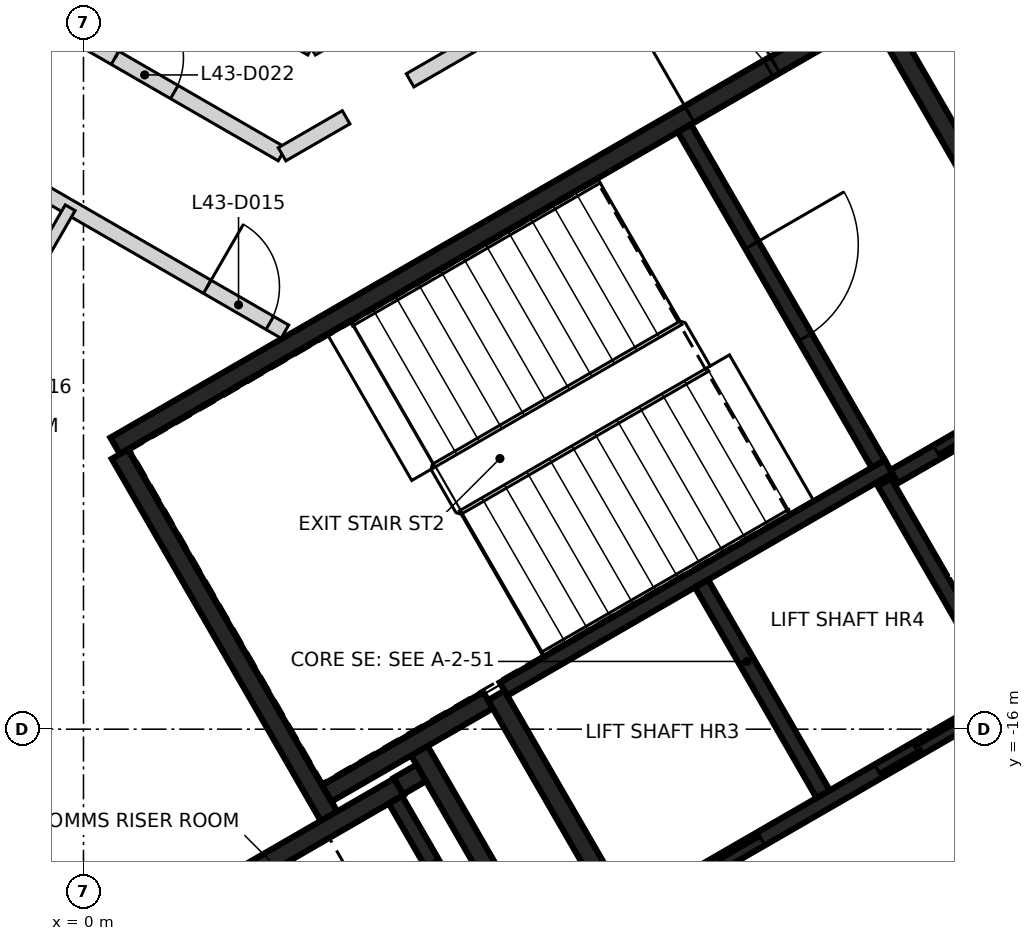
"""IFC4 building model, lengths in metres.
Left out: names, types, materials, properties, quantities, classifications, styles, units other than length and angle.
Written with IfcOpenShell. Run it as: python <this file> out.ifc"""

import sys

from ifc_helpers import new_model, si_unit, direction, frame, frame_2d, origin, place, context, subcontext, project, spatial, rectangle, extrude, element, fill, save


model = new_model("IFC4")
c1 = context("Model", 3, precision=1e-05, world=origin(), true_north=direction((0.0, 1.0)))
c2 = subcontext(c1, "Body", "Model", "MODEL_VIEW")
j1 = project(units=[si_unit("LENGTHUNIT", "METRE"), si_unit("PLANEANGLEUNIT", "RADIAN")], contexts=[c1])
p1 = place(None, origin())
s1 = spatial("IfcSite", under=j1, at=p1, CompositionType="ELEMENT")
p2 = place(p1, origin())
s2 = spatial("IfcBuilding", under=s1, at=p2, CompositionType="ELEMENT")
p3 = place(p2, frame((0.0, 0.0, 175.6)))
s3 = spatial("IfcBuildingStorey", under=s2, at=p3, CompositionType="ELEMENT", Elevation=175.6)
p4 = place(p3, frame((0.417, -12.273, 0.0), z_axis=(0.0, 0.0, 1.0), x_axis=(0.866021906294, 0.500006057782, 0.0)))
e1 = element("IfcWall", 1, at=p4, inside=s3, PredefinedType="SHEAR", context=c2, shape_type="SweptSolid", body=[
    extrude(rectangle(XDim=11.55, YDim=0.25, at=frame_2d((5.775, 0.0))), origin(), (0.0, 0.0, 1.0), 3.25),
])
p5 = place(p4, frame((10.025, 0.0, 0.0)))
e2 = element("IfcOpeningElement", 2, at=p5, cuts=e1, PredefinedType="OPENING", context=c2, shape_type="SweptSolid", body=[
    extrude(rectangle(XDim=1.2, YDim=2.1, at=frame_2d((0.6, 1.05))), frame((0.0, 0.135, 0.0), z_axis=(0.0, -1.0, 0.0), x_axis=(1.0, 0.0, 0.0)), (0.0, 0.0, 1.0), 0.27),
])
p6 = place(p4, frame((8.725, 0.0, 0.0)))
e3 = element("IfcOpeningElement", 3, at=p6, cuts=e1, PredefinedType="OPENING", context=c2, shape_type="SweptSolid", body=[
    extrude(rectangle(XDim=1.2, YDim=2.1, at=frame_2d((0.6, 1.05))), frame((0.0, 0.135, 0.0), z_axis=(0.0, -1.0, 0.0), x_axis=(1.0, 0.0, 0.0)), (0.0, 0.0, 1.0), 0.27),
])
p7 = place(p3, frame((3.235, -17.153, 0.0), z_axis=(0.0, 0.0, 1.0), x_axis=(-0.500008851346, 0.866020293397, 0.0)))
e4 = element("IfcWall", 4, at=p7, inside=s3, PredefinedType="SHEAR", context=c2, shape_type="SweptSolid", body=[
    extrude(rectangle(XDim=5.51, YDim=0.25, at=frame_2d((2.755, 0.0))), origin(), (0.0, 0.0, 1.0), 3.25),
])
p8 = place(p3, frame((10.483, -6.606, 0.0), z_axis=(0.0, 0.0, 1.0), x_axis=(0.49999885962, -0.866026062182, 0.0)))
e5 = element("IfcWall", 5, at=p8, inside=s3, PredefinedType="SHEAR", context=c2, shape_type="SweptSolid", body=[
    extrude(rectangle(XDim=5.225, YDim=0.25, at=frame_2d((2.612, 0.0))), origin(), (0.0, 0.0, 1.0), 3.25),
])
p9 = place(p3, frame((7.031, -18.327, 0.0), z_axis=(0.0, 0.0, 1.0), x_axis=(-0.499971222258, 0.866042017984, 0.0)))
e6 = element("IfcWall", 6, at=p9, inside=s3, PredefinedType="SHEAR", context=c2, shape_type="SweptSolid", body=[
    extrude(rectangle(XDim=3.2, YDim=0.25, at=frame_2d((1.6, 0.0))), origin(), (0.0, 0.0, 1.0), 3.25),
])
p10 = place(p3, frame((1.669, -18.19, 0.0), z_axis=(0.0, 0.0, 1.0), x_axis=(0.866042235819, 0.499970844928, 0.0)))
e7 = element("IfcWall", 7, at=p10, inside=s3, PredefinedType="SHEAR", context=c2, shape_type="SweptSolid", body=[
    extrude(rectangle(XDim=2.865, YDim=0.25, at=frame_2d((1.432, 0.0))), origin(), (0.0, 0.0, 1.0), 3.25),
])
p11 = place(p3, frame((4.414, -16.276, 0.0), z_axis=(0.0, 0.0, 1.0), x_axis=(0.500003324108, -0.866023484601, 0.0)))
e8 = element("IfcWall", 8, at=p11, inside=s3, PredefinedType="SHEAR", context=c2, shape_type="SweptSolid", body=[
    extrude(rectangle(XDim=3.085, YDim=0.25, at=frame_2d((1.542, 0.0))), origin(), (0.0, 0.0, 1.0), 3.25),
])
p12 = place(p3, frame((5.322, -15.619, 0.0), z_axis=(0.0, 0.0, 1.0), x_axis=(-0.866026229868, -0.499998569178, 0.0)))
e9 = element("IfcWall", 9, at=p12, inside=s3, PredefinedType="SHEAR", context=c2, shape_type="SweptSolid", body=[
    extrude(rectangle(XDim=2.449, YDim=0.25, at=frame_2d((1.225, 0.0))), origin(), (0.0, 0.0, 1.0), 3.25),
])
p13 = place(p3, frame((4.145, -16.749, 0.0), z_axis=(0.0, 0.0, 1.0), x_axis=(0.866185586049, 0.49972245349, 0.0)))
e10 = element("IfcWall", 10, at=p13, inside=s3, PredefinedType="SHEAR", context=c2, shape_type="SweptSolid", body=[
    extrude(rectangle(XDim=0.344, YDim=0.25, at=frame_2d((0.172, 0.0))), origin(), (0.0, 0.0, 1.0), 3.25),
])
p14 = place(p3, frame((9.052, -20.48, 0.0), z_axis=(0.0, 0.0, 1.0), x_axis=(0.866030299012, 0.499991521122, 0.0)))
e11 = element("IfcWall", 11, at=p14, inside=s3, PredefinedType="SHEAR", context=c2, shape_type="SweptSolid", body=[
    extrude(rectangle(XDim=6.1, YDim=0.2, at=frame_2d((3.05, 0.0))), origin(), (0.0, 0.0, 1.0), 3.25),
])
p15 = place(p3, frame((5.526, -15.472, 0.0), z_axis=(0.0, 0.0, 1.0), x_axis=(0.866041752167, 0.499971682701, 0.0)))
e12 = element("IfcWall", 12, at=p15, inside=s3, PredefinedType="SHEAR", context=c2, shape_type="SweptSolid", body=[
    extrude(rectangle(XDim=5.851, YDim=0.2, at=frame_2d((2.925, 0.0))), origin(), (0.0, 0.0, 1.0), 3.25),
])
p16 = place(p3, frame((12.293, -15.491, 0.0), z_axis=(0.0, 0.0, 1.0), x_axis=(-0.866030299012, -0.499991521122, 0.0)))
e13 = element("IfcWall", 13, at=p16, inside=s3, PredefinedType="SHEAR", context=c2, shape_type="SweptSolid", body=[
    extrude(rectangle(XDim=6.1, YDim=0.2, at=frame_2d((3.05, 0.0))), origin(), (0.0, 0.0, 1.0), 3.25),
])
p17 = place(p16, frame((3.9, 0.0, 0.0)))
e14 = element("IfcOpeningElement", 14, at=p17, cuts=e13, PredefinedType="OPENING", context=c2, shape_type="SweptSolid", body=[
    extrude(rectangle(XDim=1.2, YDim=2.1, at=frame_2d((0.6, 1.05))), frame((0.0, 0.11, 0.0), z_axis=(0.0, -1.0, 0.0), x_axis=(1.0, 0.0, 0.0)), (0.0, 0.0, 1.0), 0.22),
])
p18 = place(p16, frame((0.918, 0.0, 0.0)))
e15 = element("IfcOpeningElement", 15, at=p18, cuts=e13, PredefinedType="OPENING", context=c2, shape_type="SweptSolid", body=[
    extrude(rectangle(XDim=1.2, YDim=2.1, at=frame_2d((0.6, 1.05))), frame((0.0, 0.11, 0.0), z_axis=(0.0, -1.0, 0.0), x_axis=(1.0, 0.0, 0.0)), (0.0, 0.0, 1.0), 0.22),
])
p19 = place(p3, frame((7.906, -8.094, 0.0), z_axis=(0.0, 0.0, 1.0), x_axis=(0.500027839223, -0.866009330205, 0.0)))
e16 = element("IfcWall", 16, at=p19, inside=s3, PredefinedType="SHEAR", context=c2, shape_type="SweptSolid", body=[
    extrude(rectangle(XDim=5.098, YDim=0.2, at=frame_2d((2.549, 0.0))), origin(), (0.0, 0.0, 1.0), 3.25),
])
p20 = place(p19, frame((1.774, 0.0, 0.0)))
e17 = element("IfcOpeningElement", 17, at=p20, cuts=e16, PredefinedType="OPENING", context=c2, shape_type="SweptSolid", body=[
    extrude(rectangle(XDim=1.4, YDim=2.1, at=frame_2d((0.7, 1.05))), frame((0.0, 0.11, 0.0), z_axis=(0.0, -1.0, 0.0), x_axis=(1.0, 0.0, 0.0)), (0.0, 0.0, 1.0), 0.22),
])
p21 = place(p3, frame((8.132, -14.084, 0.0), z_axis=(0.0, 0.0, 1.0), x_axis=(0.499997778408, -0.866026686418, 0.0)))
e18 = element("IfcWall", 18, at=p21, inside=s3, PredefinedType="SHEAR", context=c2, shape_type="SweptSolid", body=[
    extrude(rectangle(XDim=3.198, YDim=0.2, at=frame_2d((1.599, 0.0))), origin(), (0.0, 0.0, 1.0), 3.25),
])
p22 = place(p3, frame((5.503, -19.352, 0.0), z_axis=(0.0, 0.0, 1.0), x_axis=(-0.499986818241, 0.866033014143, 0.0)))
e19 = element("IfcWall", 19, at=p22, inside=s3, PredefinedType="SHEAR", context=c2, shape_type="SweptSolid", body=[
    extrude(rectangle(XDim=2.798, YDim=0.2, at=frame_2d((1.399, 0.0))), origin(), (0.0, 0.0, 1.0), 3.25),
])
p23 = place(p22, frame((0.949, 0.0, 0.0)))
e20 = element("IfcOpeningElement", 20, at=p23, cuts=e19, PredefinedType="OPENING", context=c2, shape_type="SweptSolid", body=[
    extrude(rectangle(XDim=0.9, YDim=2.1, at=frame_2d((0.45, 1.05))), frame((0.0, 0.11, 0.0), z_axis=(0.0, -1.0, 0.0), x_axis=(1.0, 0.0, 0.0)), (0.0, 0.0, 1.0), 0.22),
])
p24 = place(p3, frame((12.088, -15.437, 0.0), z_axis=(0.0, 0.0, 1.0), x_axis=(-0.500026960575, 0.86600983753, 0.0)))
e21 = element("IfcWall", 21, at=p24, inside=s3, PredefinedType="SHEAR", context=c2, shape_type="SweptSolid", body=[
    extrude(rectangle(XDim=3.1, YDim=0.2, at=frame_2d((1.55, 0.0))), origin(), (0.0, 0.0, 1.0), 3.25),
])
p25 = place(p3, frame((10.666, -12.678, 0.0), z_axis=(0.0, 0.0, 1.0), x_axis=(0.866018407898, 0.500012117035, 0.0)))
e22 = element("IfcWall", 22, at=p25, inside=s3, PredefinedType="SHEAR", context=c2, shape_type="SweptSolid", body=[
    extrude(rectangle(XDim=2.651, YDim=0.2, at=frame_2d((1.325, 0.0))), origin(), (0.0, 0.0, 1.0), 3.25),
])
p26 = place(p25, frame((0.652, 0.0, 0.0)))
e23 = element("IfcOpeningElement", 23, at=p26, cuts=e22, PredefinedType="OPENING", context=c2, shape_type="SweptSolid", body=[
    extrude(rectangle(XDim=1.3, YDim=2.1, at=frame_2d((0.65, 1.05))), frame((0.0, 0.11, 0.0), z_axis=(0.0, -1.0, 0.0), x_axis=(1.0, 0.0, 0.0)), (0.0, 0.0, 1.0), 0.22),
])
p27 = place(p3, frame((-8.612, -1.956, 0.0), z_axis=(0.0, 0.0, 1.0), x_axis=(0.866034386606, -0.499984440973, 0.0)))
e24 = element("IfcWall", 24, at=p27, inside=s3, PredefinedType="PARTITIONING", context=c2, shape_type="SweptSolid", body=[
    extrude(rectangle(XDim=12.96, YDim=0.2, at=frame_2d((6.48, 0.0))), origin(), (0.0, 0.0, 1.0), 3.25),
])
p28 = place(p27, frame((3.955, 0.0, 0.0)))
e25 = element("IfcOpeningElement", 25, at=p28, cuts=e24, PredefinedType="OPENING", context=c2, shape_type="SweptSolid", body=[
    extrude(rectangle(XDim=0.9, YDim=2.1, at=frame_2d((0.45, 1.05))), frame((0.0, 0.11, 0.0), z_axis=(0.0, -1.0, 0.0), x_axis=(1.0, 0.0, 0.0)), (0.0, 0.0, 1.0), 0.22),
])
p29 = place(p27, frame((10.424, 0.0, 0.0)))
e26 = element("IfcOpeningElement", 26, at=p29, cuts=e24, PredefinedType="OPENING", context=c2, shape_type="SweptSolid", body=[
    extrude(rectangle(XDim=0.9, YDim=2.1, at=frame_2d((0.45, 1.05))), frame((0.0, 0.11, 0.0), z_axis=(0.0, -1.0, 0.0), x_axis=(1.0, 0.0, 0.0)), (0.0, 0.0, 1.0), 0.22),
])
p30 = place(p3, frame((-8.33, -4.428, 0.0), z_axis=(0.0, 0.0, 1.0), x_axis=(0.865923263811, -0.500176869909, 0.0)))
e27 = element("IfcWall", 27, at=p30, inside=s3, PredefinedType="PARTITIONING", context=c2, shape_type="SweptSolid", body=[
    extrude(rectangle(XDim=12.68, YDim=0.2, at=frame_2d((6.34, 0.0))), origin(), (0.0, 0.0, 1.0), 3.25),
])
p31 = place(p30, frame((2.87, 0.0, 0.0)))
e28 = element("IfcOpeningElement", 28, at=p31, cuts=e27, PredefinedType="OPENING", context=c2, shape_type="SweptSolid", body=[
    extrude(rectangle(XDim=0.95, YDim=2.1, at=frame_2d((0.475, 1.05))), frame((0.0, 0.11, 0.0), z_axis=(0.0, -1.0, 0.0), x_axis=(1.0, 0.0, 0.0)), (0.0, 0.0, 1.0), 0.22),
])
p32 = place(p30, frame((11.5, 0.0, 0.0)))
e29 = element("IfcOpeningElement", 29, at=p32, cuts=e27, PredefinedType="OPENING", context=c2, shape_type="SweptSolid", body=[
    extrude(rectangle(XDim=0.95, YDim=2.1, at=frame_2d((0.475, 1.05))), frame((0.0, 0.11, 0.0), z_axis=(0.0, -1.0, 0.0), x_axis=(1.0, 0.0, 0.0)), (0.0, 0.0, 1.0), 0.22),
])
p33 = place(p3, frame((2.612, -8.437, 0.0), z_axis=(0.0, 0.0, 1.0), x_axis=(0.866026830048, 0.499997529631, 0.0)))
e30 = element("IfcWall", 30, at=p33, inside=s3, PredefinedType="PARTITIONING", context=c2, shape_type="SweptSolid", body=[
    extrude(rectangle(XDim=0.973, YDim=0.2, at=frame_2d((0.487, 0.0))), origin(), (0.0, 0.0, 1.0), 3.25),
])
p34 = place(p3, frame((4.297, -7.464, 0.0), z_axis=(0.0, 0.0, 1.0), x_axis=(0.866026378386, 0.499998311937, 0.0)))
e31 = element("IfcWall", 31, at=p34, inside=s3, PredefinedType="PARTITIONING", context=c2, shape_type="SweptSolid", body=[
    extrude(rectangle(XDim=1.966, YDim=0.2, at=frame_2d((0.983, 0.0))), origin(), (0.0, 0.0, 1.0), 3.25),
])
p35 = place(p3, frame((11.216, -5.058, 0.0), z_axis=(0.0, 0.0, 1.0), x_axis=(0.51393500197, -0.857829128527, 0.0)))
e32 = element("IfcWall", 32, at=p35, inside=s3, PredefinedType="PARTITIONING", context=c2, shape_type="SweptSolid", body=[
    extrude(rectangle(XDim=10.951, YDim=0.2, at=frame_2d((5.475, 0.0))), origin(), (0.0, 0.0, 1.0), 3.25),
])
p36 = place(p35, frame((4.438, 0.0, 0.0)))
e33 = element("IfcOpeningElement", 33, at=p36, cuts=e32, PredefinedType="OPENING", context=c2, shape_type="SweptSolid", body=[
    extrude(rectangle(XDim=0.95, YDim=2.1, at=frame_2d((0.475, 1.05))), frame((0.0, 0.11, 0.0), z_axis=(0.0, -1.0, 0.0), x_axis=(1.0, 0.0, 0.0)), (0.0, 0.0, 1.0), 0.22),
])
p37 = place(p3, frame((-7.6, -0.924, 0.0), z_axis=(0.0, 0.0, 1.0), x_axis=(0.866028806638, -0.499994106039, 0.0)))
e34 = element("IfcWall", 34, at=p37, inside=s3, PredefinedType="PARTITIONING", context=c2, shape_type="SweptSolid", body=[
    extrude(rectangle(XDim=12.24, YDim=0.2, at=frame_2d((6.12, 0.0))), origin(), (0.0, 0.0, 1.0), 3.25),
])
p38 = place(p3, frame((3.0, -7.044, 0.0), z_axis=(0.0, 0.0, 1.0), x_axis=(0.865875248522, 0.500259986404, 0.0)))
e35 = element("IfcWall", 35, at=p38, inside=s3, PredefinedType="PARTITIONING", context=c2, shape_type="SweptSolid", body=[
    extrude(rectangle(XDim=1.848, YDim=0.2, at=frame_2d((0.924, 0.0))), origin(), (0.0, 0.0, 1.0), 3.25),
])
p39 = place(p3, frame((-1.371, -11.213, 0.0), z_axis=(0.0, 0.0, 1.0), x_axis=(0.499748946523, 0.866170301066, 0.0)))
e36 = element("IfcWall", 36, at=p39, inside=s3, PredefinedType="PARTITIONING", context=c2, shape_type="SweptSolid", body=[
    extrude(rectangle(XDim=2.393, YDim=0.15, at=frame_2d((1.197, 0.0))), origin(), (0.0, 0.0, 1.0), 3.25),
])
p40 = place(p39, frame((0.796, 0.0, 0.0)))
e37 = element("IfcOpeningElement", 37, at=p40, cuts=e36, PredefinedType="OPENING", context=c2, shape_type="SweptSolid", body=[
    extrude(rectangle(XDim=0.8, YDim=2.1, at=frame_2d((0.4, 1.05))), frame((0.0, 0.085, 0.0), z_axis=(0.0, -1.0, 0.0), x_axis=(1.0, 0.0, 0.0)), (0.0, 0.0, 1.0), 0.17),
])
p41 = place(p26, origin())
e38 = element("IfcDoor", 38, at=p41, inside=s3, OperationType="SLIDING_TO_LEFT", PredefinedType="DOOR", context=c2, shape_type="SweptSolid", body=[
    extrude(rectangle(XDim=1.3, YDim=2.1, at=frame_2d((0.65, 1.05))), frame((0.0, 0.025, 0.0), z_axis=(0.0, -1.0, 0.0), x_axis=(1.0, 0.0, 0.0)), (0.0, 0.0, 1.0), 0.05),
])
fill(e23, e38)
p42 = place(p17, origin())
e39 = element("IfcDoor", 39, at=p42, inside=s3, OperationType="DOUBLE_DOOR_SLIDING", PredefinedType="DOOR", context=c2, shape_type="SweptSolid", body=[
    extrude(rectangle(XDim=1.2, YDim=2.1, at=frame_2d((0.6, 1.05))), frame((0.0, 0.025, 0.0), z_axis=(0.0, -1.0, 0.0), x_axis=(1.0, 0.0, 0.0)), (0.0, 0.0, 1.0), 0.05),
])
fill(e14, e39)
p43 = place(p18, origin())
e40 = element("IfcDoor", 40, at=p43, inside=s3, OperationType="DOUBLE_DOOR_SLIDING", PredefinedType="DOOR", context=c2, shape_type="SweptSolid", body=[
    extrude(rectangle(XDim=1.2, YDim=2.1, at=frame_2d((0.6, 1.05))), frame((0.0, 0.025, 0.0), z_axis=(0.0, -1.0, 0.0), x_axis=(1.0, 0.0, 0.0)), (0.0, 0.0, 1.0), 0.05),
])
fill(e15, e40)
p44 = place(p5, origin())
e41 = element("IfcDoor", 41, at=p44, inside=s3, OperationType="SINGLE_SWING_LEFT", PredefinedType="DOOR", context=c2, shape_type="SweptSolid", body=[
    extrude(rectangle(XDim=1.2, YDim=2.1, at=frame_2d((0.6, 1.05))), frame((0.0, 0.025, 0.0), z_axis=(0.0, -1.0, 0.0), x_axis=(1.0, 0.0, 0.0)), (0.0, 0.0, 1.0), 0.05),
])
fill(e2, e41)
p45 = place(p6, origin())
e42 = element("IfcDoor", 42, at=p45, inside=s3, OperationType="SINGLE_SWING_RIGHT", PredefinedType="DOOR", context=c2, shape_type="SweptSolid", body=[
    extrude(rectangle(XDim=1.2, YDim=2.1, at=frame_2d((0.6, 1.05))), frame((0.0, 0.025, 0.0), z_axis=(0.0, -1.0, 0.0), x_axis=(1.0, 0.0, 0.0)), (0.0, 0.0, 1.0), 0.05),
])
fill(e3, e42)
p46 = place(p20, origin())
e43 = element("IfcDoor", 43, at=p46, inside=s3, OperationType="SINGLE_SWING_LEFT", PredefinedType="DOOR", context=c2, shape_type="SweptSolid", body=[
    extrude(rectangle(XDim=1.4, YDim=2.1, at=frame_2d((0.7, 1.05))), frame((0.0, 0.025, 0.0), z_axis=(0.0, -1.0, 0.0), x_axis=(1.0, 0.0, 0.0)), (0.0, 0.0, 1.0), 0.05),
])
fill(e17, e43)
p47 = place(p32, frame((0.95, 0.0, 0.0), z_axis=(0.0, 0.0, 1.0), x_axis=(-1.0, 0.0, 0.0)))
e44 = element("IfcDoor", 44, at=p47, inside=s3, OperationType="SINGLE_SWING_LEFT", PredefinedType="DOOR", context=c2, shape_type="SweptSolid", body=[
    extrude(rectangle(XDim=0.95, YDim=2.1, at=frame_2d((0.475, 1.05))), frame((0.0, 0.025, 0.0), z_axis=(0.0, -1.0, 0.0), x_axis=(1.0, 0.0, 0.0)), (0.0, 0.0, 1.0), 0.05),
])
fill(e29, e44)
p48 = place(p29, origin())
e45 = element("IfcDoor", 45, at=p48, inside=s3, OperationType="SINGLE_SWING_LEFT", PredefinedType="DOOR", context=c2, shape_type="SweptSolid", body=[
    extrude(rectangle(XDim=0.9, YDim=2.1, at=frame_2d((0.45, 1.05))), frame((0.0, 0.025, 0.0), z_axis=(0.0, -1.0, 0.0), x_axis=(1.0, 0.0, 0.0)), (0.0, 0.0, 1.0), 0.05),
])
fill(e26, e45)
save(model, sys.argv[1])
